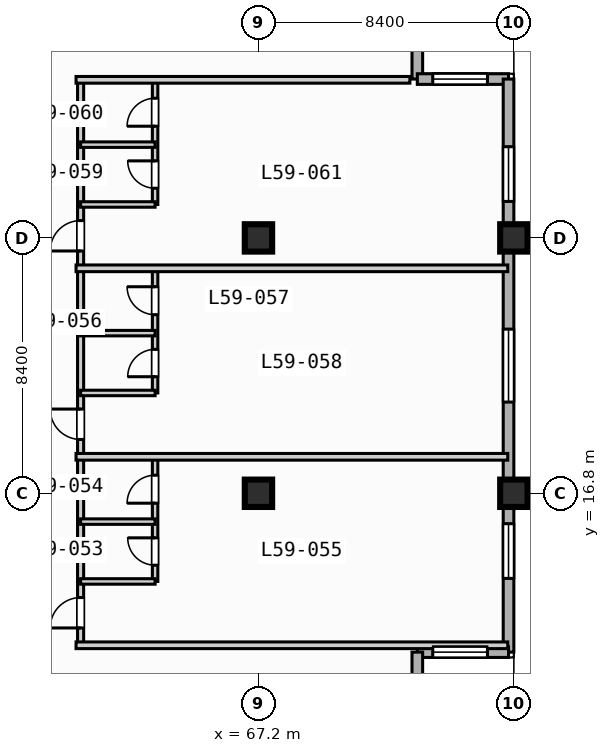
"""IFC4 building model, lengths in metres.
Left out: names, types, materials, properties, quantities, classifications, styles, units other than length and angle.
Written with IfcOpenShell. Run it as: python <this file> out.ifc"""

import sys

from ifc_helpers import new_model, si_unit, direction, frame, frame_2d, origin, origin_2d, place, context, subcontext, project, spatial, rectangle, extrude, element, fill, save


model = new_model("IFC4")
c1 = context("Model", 3, precision=1e-05, world=origin(), true_north=direction((0.0, 1.0)))
c2 = subcontext(c1, "Body", "Model", "MODEL_VIEW")
j1 = project(units=[si_unit("LENGTHUNIT", "METRE"), si_unit("PLANEANGLEUNIT", "RADIAN")], contexts=[c1])
p1 = place(None, origin())
s1 = spatial("IfcSite", under=j1, at=p1, CompositionType="ELEMENT")
p2 = place(p1, origin())
s2 = spatial("IfcBuilding", under=s1, at=p2, CompositionType="ELEMENT")
p3 = place(p2, frame((0.0, 0.0, 241.6)))
s3 = spatial("IfcBuildingStorey", under=s2, at=p3, CompositionType="ELEMENT", Elevation=241.6)
for number, where, z_axis, x_axis in (
    (1, (67.2, 16.8, 0.0), (0.0, 0.0, 1.0), (1.0, 0.0, 0.0)),
    (2, (67.2, 25.2, 0.0), (0.0, 0.0, 1.0), (1.0, 0.0, 0.0)),
    (3, (75.6, 16.8, 0.0), (0.0, 0.0, 1.0), (1.0, 0.0, 0.0)),
    (4, (75.6, 25.2, 0.0), (0.0, 0.0, 1.0), (1.0, 0.0, 0.0)),
):
    element("IfcColumn", number, at=place(p3, frame(where, z_axis=z_axis, x_axis=x_axis)), inside=s3, PredefinedType="COLUMN", context=c2, shape_type="SweptSolid", body=[
        extrude(rectangle(XDim=0.9, YDim=0.9, at=origin_2d()), origin(), (0.0, 0.0, 1.0), 3.7),
    ])
p4 = place(p3, frame((72.425, 33.425, 0.0), z_axis=(0.0, 0.0, 1.0), x_axis=(0.0, -1.0, 0.0)))
e5 = element("IfcWall", 5, at=p4, inside=s3, PredefinedType="STANDARD", context=c2, shape_type="SweptSolid", body=[
    extrude(rectangle(XDim=3.0, YDim=0.35, at=frame_2d((1.5, 0.0))), origin(), (0.0, 0.0, 1.0), 3.47),
])
p5 = place(p3, frame((72.425, 30.425, 0.0), z_axis=(0.0, 0.0, 1.0), x_axis=(1.0, 0.0, 0.0)))
e6 = element("IfcWall", 6, at=p5, inside=s3, PredefinedType="STANDARD", context=c2, shape_type="SweptSolid", body=[
    extrude(rectangle(XDim=3.0, YDim=0.35, at=frame_2d((1.5, 0.0))), origin(), (0.0, 0.0, 1.0), 3.47),
])
p6 = place(p5, frame((0.508, 0.0, 0.85)))
e7 = element("IfcOpeningElement", 7, at=p6, cuts=e6, PredefinedType="OPENING", context=c2, shape_type="SweptSolid", body=[
    extrude(rectangle(XDim=1.8, YDim=1.8, at=frame_2d((0.9, 0.9))), frame((0.0, 0.185, 0.0), z_axis=(0.0, -1.0, 0.0), x_axis=(1.0, 0.0, 0.0)), (0.0, 0.0, 1.0), 0.37),
])
p7 = place(p3, frame((75.425, 30.425, 0.0), z_axis=(0.0, 0.0, 1.0), x_axis=(0.0, -1.0, 0.0)))
e8 = element("IfcWall", 8, at=p7, inside=s3, PredefinedType="STANDARD", context=c2, shape_type="SweptSolid", body=[
    extrude(rectangle(XDim=18.85, YDim=0.35, at=frame_2d((9.425, 0.0))), origin(), (0.0, 0.0, 1.0), 3.47),
])
p8 = place(p7, frame((8.225, 0.0, 0.85)))
e9 = element("IfcOpeningElement", 9, at=p8, cuts=e8, PredefinedType="OPENING", context=c2, shape_type="SweptSolid", body=[
    extrude(rectangle(XDim=2.4, YDim=1.95, at=frame_2d((1.2, 0.975))), frame((0.0, 0.185, 0.0), z_axis=(0.0, -1.0, 0.0), x_axis=(1.0, 0.0, 0.0)), (0.0, 0.0, 1.0), 0.37),
])
p9 = place(p7, frame((14.625, 0.0, 0.85)))
e10 = element("IfcOpeningElement", 10, at=p9, cuts=e8, PredefinedType="OPENING", context=c2, shape_type="SweptSolid", body=[
    extrude(rectangle(XDim=1.8, YDim=1.8, at=frame_2d((0.9, 0.9))), frame((0.0, 0.185, 0.0), z_axis=(0.0, -1.0, 0.0), x_axis=(1.0, 0.0, 0.0)), (0.0, 0.0, 1.0), 0.37),
])
p10 = place(p7, frame((2.225, 0.0, 0.85)))
e11 = element("IfcOpeningElement", 11, at=p10, cuts=e8, PredefinedType="OPENING", context=c2, shape_type="SweptSolid", body=[
    extrude(rectangle(XDim=1.8, YDim=1.8, at=frame_2d((0.9, 0.9))), frame((0.0, 0.185, 0.0), z_axis=(0.0, -1.0, 0.0), x_axis=(1.0, 0.0, 0.0)), (0.0, 0.0, 1.0), 0.37),
])
p11 = place(p3, frame((75.425, 11.575, 0.0), z_axis=(0.0, 0.0, 1.0), x_axis=(-1.0, 0.0, 0.0)))
e12 = element("IfcWall", 12, at=p11, inside=s3, PredefinedType="STANDARD", context=c2, shape_type="SweptSolid", body=[
    extrude(rectangle(XDim=3.0, YDim=0.35, at=frame_2d((1.5, 0.0))), origin(), (0.0, 0.0, 1.0), 3.47),
])
p12 = place(p11, frame((0.692, 0.0, 0.85)))
e13 = element("IfcOpeningElement", 13, at=p12, cuts=e12, PredefinedType="OPENING", context=c2, shape_type="SweptSolid", body=[
    extrude(rectangle(XDim=1.8, YDim=1.8, at=frame_2d((0.9, 0.9))), frame((0.0, 0.185, 0.0), z_axis=(0.0, -1.0, 0.0), x_axis=(1.0, 0.0, 0.0)), (0.0, 0.0, 1.0), 0.37),
])
p13 = place(p3, frame((72.425, 11.575, 0.0), z_axis=(0.0, 0.0, 1.0), x_axis=(0.0, -1.0, 0.0)))
e14 = element("IfcWall", 14, at=p13, inside=s3, PredefinedType="STANDARD", context=c2, shape_type="SweptSolid", body=[
    extrude(rectangle(XDim=3.0, YDim=0.35, at=frame_2d((1.5, 0.0))), origin(), (0.0, 0.0, 1.0), 3.47),
])
p14 = place(p3, frame((61.35, 11.8, 0.0), z_axis=(0.0, 0.0, 1.0), x_axis=(0.0, 1.0, 0.0)))
e15 = element("IfcWall", 15, at=p14, inside=s3, PredefinedType="PARTITIONING", context=c2, shape_type="SweptSolid", body=[
    extrude(rectangle(XDim=18.6, YDim=0.2, at=frame_2d((9.3, 0.0))), origin(), (0.0, 0.0, 1.0), 3.47),
])
p15 = place(p14, frame((0.57, 0.0, 0.0)))
e16 = element("IfcOpeningElement", 16, at=p15, cuts=e15, PredefinedType="OPENING", context=c2, shape_type="SweptSolid", body=[
    extrude(rectangle(XDim=1.0, YDim=2.15, at=frame_2d((0.5, 1.075))), frame((0.0, 0.11, 0.0), z_axis=(0.0, -1.0, 0.0), x_axis=(1.0, 0.0, 0.0)), (0.0, 0.0, 1.0), 0.22),
])
p16 = place(p14, frame((6.77, 0.0, 0.0)))
e17 = element("IfcOpeningElement", 17, at=p16, cuts=e15, PredefinedType="OPENING", context=c2, shape_type="SweptSolid", body=[
    extrude(rectangle(XDim=1.0, YDim=2.15, at=frame_2d((0.5, 1.075))), frame((0.0, 0.11, 0.0), z_axis=(0.0, -1.0, 0.0), x_axis=(1.0, 0.0, 0.0)), (0.0, 0.0, 1.0), 0.22),
])
p17 = place(p14, frame((12.97, 0.0, 0.0)))
e18 = element("IfcOpeningElement", 18, at=p17, cuts=e15, PredefinedType="OPENING", context=c2, shape_type="SweptSolid", body=[
    extrude(rectangle(XDim=1.0, YDim=2.15, at=frame_2d((0.5, 1.075))), frame((0.0, 0.11, 0.0), z_axis=(0.0, -1.0, 0.0), x_axis=(1.0, 0.0, 0.0)), (0.0, 0.0, 1.0), 0.22),
])
p18 = place(p3, frame((61.2, 11.8, 0.0), z_axis=(0.0, 0.0, 1.0), x_axis=(1.0, 0.0, 0.0)))
e19 = element("IfcWall", 19, at=p18, inside=s3, PredefinedType="PARTITIONING", context=c2, shape_type="SweptSolid", body=[
    extrude(rectangle(XDim=14.2, YDim=0.22, at=frame_2d((7.1, 0.0))), origin(), (0.0, 0.0, 1.0), 3.47),
])
p19 = place(p3, frame((63.8, 13.9, 0.0), z_axis=(0.0, 0.0, 1.0), x_axis=(0.0, 1.0, 0.0)))
e20 = element("IfcWall", 20, at=p19, inside=s3, PredefinedType="PLUMBINGWALL", context=c2, shape_type="SweptSolid", body=[
    extrude(rectangle(XDim=4.1, YDim=0.18, at=frame_2d((2.05, 0.0))), origin(), (0.0, 0.0, 1.0), 3.47),
])
p20 = place(p19, frame((0.534, 0.0, 0.0)))
e21 = element("IfcOpeningElement", 21, at=p20, cuts=e20, PredefinedType="OPENING", context=c2, shape_type="SweptSolid", body=[
    extrude(rectangle(XDim=0.9, YDim=2.1, at=frame_2d((0.45, 1.05))), frame((0.0, 0.1, 0.0), z_axis=(0.0, -1.0, 0.0), x_axis=(1.0, 0.0, 0.0)), (0.0, 0.0, 1.0), 0.2),
])
p21 = place(p19, frame((2.574, 0.0, 0.0)))
e22 = element("IfcOpeningElement", 22, at=p21, cuts=e20, PredefinedType="OPENING", context=c2, shape_type="SweptSolid", body=[
    extrude(rectangle(XDim=0.92, YDim=2.1, at=frame_2d((0.46, 1.05))), frame((0.0, 0.1, 0.0), z_axis=(0.0, -1.0, 0.0), x_axis=(1.0, 0.0, 0.0)), (0.0, 0.0, 1.0), 0.2),
])
for number, where, z_axis, x_axis in (
    (23, (61.35, 13.9, 0.0), (0.0, 0.0, 1.0), (1.0, 0.0, 0.0)),
    (24, (61.35, 15.868, 0.0), (0.0, 0.0, 1.0), (1.0, 0.0, 0.0)),
):
    element("IfcWall", number, at=place(p3, frame(where, z_axis=z_axis, x_axis=x_axis)), inside=s3, PredefinedType="PLUMBINGWALL", context=c2, shape_type="SweptSolid", body=[
        extrude(rectangle(XDim=2.45, YDim=0.18, at=frame_2d((1.225, 0.0))), origin(), (0.0, 0.0, 1.0), 3.47),
    ])
p22 = place(p3, frame((61.2, 18.0, 0.0), z_axis=(0.0, 0.0, 1.0), x_axis=(1.0, 0.0, 0.0)))
e25 = element("IfcWall", 25, at=p22, inside=s3, PredefinedType="PARTITIONING", context=c2, shape_type="SweptSolid", body=[
    extrude(rectangle(XDim=14.2, YDim=0.22, at=frame_2d((7.1, 0.0))), origin(), (0.0, 0.0, 1.0), 3.47),
])
p23 = place(p3, frame((63.8, 20.1, 0.0), z_axis=(0.0, 0.0, 1.0), x_axis=(0.0, 1.0, 0.0)))
e26 = element("IfcWall", 26, at=p23, inside=s3, PredefinedType="PLUMBINGWALL", context=c2, shape_type="SweptSolid", body=[
    extrude(rectangle(XDim=4.1, YDim=0.18, at=frame_2d((2.05, 0.0))), origin(), (0.0, 0.0, 1.0), 3.47),
])
p24 = place(p23, frame((0.534, 0.0, 0.0)))
e27 = element("IfcOpeningElement", 27, at=p24, cuts=e26, PredefinedType="OPENING", context=c2, shape_type="SweptSolid", body=[
    extrude(rectangle(XDim=0.9, YDim=2.1, at=frame_2d((0.45, 1.05))), frame((0.0, 0.1, 0.0), z_axis=(0.0, -1.0, 0.0), x_axis=(1.0, 0.0, 0.0)), (0.0, 0.0, 1.0), 0.2),
])
p25 = place(p23, frame((2.574, 0.0, 0.0)))
e28 = element("IfcOpeningElement", 28, at=p25, cuts=e26, PredefinedType="OPENING", context=c2, shape_type="SweptSolid", body=[
    extrude(rectangle(XDim=0.92, YDim=2.1, at=frame_2d((0.46, 1.05))), frame((0.0, 0.1, 0.0), z_axis=(0.0, -1.0, 0.0), x_axis=(1.0, 0.0, 0.0)), (0.0, 0.0, 1.0), 0.2),
])
for number, where, z_axis, x_axis in (
    (29, (61.35, 20.1, 0.0), (0.0, 0.0, 1.0), (1.0, 0.0, 0.0)),
    (30, (61.35, 22.068, 0.0), (0.0, 0.0, 1.0), (1.0, 0.0, 0.0)),
):
    element("IfcWall", number, at=place(p3, frame(where, z_axis=z_axis, x_axis=x_axis)), inside=s3, PredefinedType="PLUMBINGWALL", context=c2, shape_type="SweptSolid", body=[
        extrude(rectangle(XDim=2.45, YDim=0.18, at=frame_2d((1.225, 0.0))), origin(), (0.0, 0.0, 1.0), 3.47),
    ])
p26 = place(p3, frame((61.2, 24.2, 0.0), z_axis=(0.0, 0.0, 1.0), x_axis=(1.0, 0.0, 0.0)))
e31 = element("IfcWall", 31, at=p26, inside=s3, PredefinedType="PARTITIONING", context=c2, shape_type="SweptSolid", body=[
    extrude(rectangle(XDim=14.2, YDim=0.22, at=frame_2d((7.1, 0.0))), origin(), (0.0, 0.0, 1.0), 3.47),
])
p27 = place(p3, frame((63.8, 26.3, 0.0), z_axis=(0.0, 0.0, 1.0), x_axis=(0.0, 1.0, 0.0)))
e32 = element("IfcWall", 32, at=p27, inside=s3, PredefinedType="PLUMBINGWALL", context=c2, shape_type="SweptSolid", body=[
    extrude(rectangle(XDim=4.1, YDim=0.18, at=frame_2d((2.05, 0.0))), origin(), (0.0, 0.0, 1.0), 3.47),
])
p28 = place(p27, frame((0.534, 0.0, 0.0)))
e33 = element("IfcOpeningElement", 33, at=p28, cuts=e32, PredefinedType="OPENING", context=c2, shape_type="SweptSolid", body=[
    extrude(rectangle(XDim=0.9, YDim=2.1, at=frame_2d((0.45, 1.05))), frame((0.0, 0.1, 0.0), z_axis=(0.0, -1.0, 0.0), x_axis=(1.0, 0.0, 0.0)), (0.0, 0.0, 1.0), 0.2),
])
p29 = place(p27, frame((2.574, 0.0, 0.0)))
e34 = element("IfcOpeningElement", 34, at=p29, cuts=e32, PredefinedType="OPENING", context=c2, shape_type="SweptSolid", body=[
    extrude(rectangle(XDim=0.92, YDim=2.1, at=frame_2d((0.46, 1.05))), frame((0.0, 0.1, 0.0), z_axis=(0.0, -1.0, 0.0), x_axis=(1.0, 0.0, 0.0)), (0.0, 0.0, 1.0), 0.2),
])
for number, where, z_axis, x_axis in (
    (35, (61.35, 26.3, 0.0), (0.0, 0.0, 1.0), (1.0, 0.0, 0.0)),
    (36, (61.35, 28.268, 0.0), (0.0, 0.0, 1.0), (1.0, 0.0, 0.0)),
):
    element("IfcWall", number, at=place(p3, frame(where, z_axis=z_axis, x_axis=x_axis)), inside=s3, PredefinedType="PLUMBINGWALL", context=c2, shape_type="SweptSolid", body=[
        extrude(rectangle(XDim=2.45, YDim=0.18, at=frame_2d((1.225, 0.0))), origin(), (0.0, 0.0, 1.0), 3.47),
    ])
p30 = place(p3, frame((61.2, 30.4, 0.0), z_axis=(0.0, 0.0, 1.0), x_axis=(1.0, 0.0, 0.0)))
e37 = element("IfcWall", 37, at=p30, inside=s3, PredefinedType="PARTITIONING", context=c2, shape_type="SweptSolid", body=[
    extrude(rectangle(XDim=10.98, YDim=0.22, at=frame_2d((5.49, 0.0))), origin(), (0.0, 0.0, 1.0), 3.47),
])
p31 = place(p6, origin())
e38 = element("IfcWindow", 38, at=p31, inside=s3, PartitioningType="SINGLE_PANEL", PredefinedType="WINDOW", context=c2, shape_type="SweptSolid", body=[
    extrude(rectangle(XDim=1.8, YDim=1.8, at=frame_2d((0.9, 0.9))), frame((0.0, 0.03, 0.0), z_axis=(0.0, -1.0, 0.0), x_axis=(1.0, 0.0, 0.0)), (0.0, 0.0, 1.0), 0.06),
])
fill(e7, e38)
p32 = place(p8, origin())
e39 = element("IfcWindow", 39, at=p32, inside=s3, PartitioningType="SINGLE_PANEL", PredefinedType="WINDOW", context=c2, shape_type="SweptSolid", body=[
    extrude(rectangle(XDim=2.4, YDim=1.95, at=frame_2d((1.2, 0.975))), frame((0.0, 0.03, 0.0), z_axis=(0.0, -1.0, 0.0), x_axis=(1.0, 0.0, 0.0)), (0.0, 0.0, 1.0), 0.06),
])
fill(e9, e39)
p33 = place(p9, origin())
e40 = element("IfcWindow", 40, at=p33, inside=s3, PartitioningType="SINGLE_PANEL", PredefinedType="WINDOW", context=c2, shape_type="SweptSolid", body=[
    extrude(rectangle(XDim=1.8, YDim=1.8, at=frame_2d((0.9, 0.9))), frame((0.0, 0.03, 0.0), z_axis=(0.0, -1.0, 0.0), x_axis=(1.0, 0.0, 0.0)), (0.0, 0.0, 1.0), 0.06),
])
fill(e10, e40)
p34 = place(p10, origin())
e41 = element("IfcWindow", 41, at=p34, inside=s3, PartitioningType="SINGLE_PANEL", PredefinedType="WINDOW", context=c2, shape_type="SweptSolid", body=[
    extrude(rectangle(XDim=1.8, YDim=1.8, at=frame_2d((0.9, 0.9))), frame((0.0, 0.03, 0.0), z_axis=(0.0, -1.0, 0.0), x_axis=(1.0, 0.0, 0.0)), (0.0, 0.0, 1.0), 0.06),
])
fill(e11, e41)
p35 = place(p12, origin())
e42 = element("IfcWindow", 42, at=p35, inside=s3, PartitioningType="SINGLE_PANEL", PredefinedType="WINDOW", context=c2, shape_type="SweptSolid", body=[
    extrude(rectangle(XDim=1.8, YDim=1.8, at=frame_2d((0.9, 0.9))), frame((0.0, 0.03, 0.0), z_axis=(0.0, -1.0, 0.0), x_axis=(1.0, 0.0, 0.0)), (0.0, 0.0, 1.0), 0.06),
])
fill(e13, e42)
p36 = place(p15, origin())
e43 = element("IfcDoor", 43, at=p36, inside=s3, OperationType="SINGLE_SWING_LEFT", PredefinedType="DOOR", context=c2, shape_type="SweptSolid", body=[
    extrude(rectangle(XDim=1.0, YDim=2.15, at=frame_2d((0.5, 1.075))), frame((0.0, 0.025, 0.0), z_axis=(0.0, -1.0, 0.0), x_axis=(1.0, 0.0, 0.0)), (0.0, 0.0, 1.0), 0.05),
])
fill(e16, e43)
p37 = place(p16, origin())
e44 = element("IfcDoor", 44, at=p37, inside=s3, OperationType="SINGLE_SWING_RIGHT", PredefinedType="DOOR", context=c2, shape_type="SweptSolid", body=[
    extrude(rectangle(XDim=1.0, YDim=2.15, at=frame_2d((0.5, 1.075))), frame((0.0, 0.025, 0.0), z_axis=(0.0, -1.0, 0.0), x_axis=(1.0, 0.0, 0.0)), (0.0, 0.0, 1.0), 0.05),
])
fill(e17, e44)
p38 = place(p17, origin())
e45 = element("IfcDoor", 45, at=p38, inside=s3, OperationType="SINGLE_SWING_LEFT", PredefinedType="DOOR", context=c2, shape_type="SweptSolid", body=[
    extrude(rectangle(XDim=1.0, YDim=2.15, at=frame_2d((0.5, 1.075))), frame((0.0, 0.025, 0.0), z_axis=(0.0, -1.0, 0.0), x_axis=(1.0, 0.0, 0.0)), (0.0, 0.0, 1.0), 0.05),
])
fill(e18, e45)
p39 = place(p20, origin())
e46 = element("IfcDoor", 46, at=p39, inside=s3, OperationType="SINGLE_SWING_RIGHT", PredefinedType="DOOR", context=c2, shape_type="SweptSolid", body=[
    extrude(rectangle(XDim=0.9, YDim=2.1, at=frame_2d((0.45, 1.05))), frame((0.0, 0.025, 0.0), z_axis=(0.0, -1.0, 0.0), x_axis=(1.0, 0.0, 0.0)), (0.0, 0.0, 1.0), 0.05),
])
fill(e21, e46)
p40 = place(p21, origin())
e47 = element("IfcDoor", 47, at=p40, inside=s3, OperationType="SINGLE_SWING_LEFT", PredefinedType="DOOR", context=c2, shape_type="SweptSolid", body=[
    extrude(rectangle(XDim=0.92, YDim=2.1, at=frame_2d((0.46, 1.05))), frame((0.0, 0.025, 0.0), z_axis=(0.0, -1.0, 0.0), x_axis=(1.0, 0.0, 0.0)), (0.0, 0.0, 1.0), 0.05),
])
fill(e22, e47)
p41 = place(p24, origin())
e48 = element("IfcDoor", 48, at=p41, inside=s3, OperationType="SINGLE_SWING_LEFT", PredefinedType="DOOR", context=c2, shape_type="SweptSolid", body=[
    extrude(rectangle(XDim=0.9, YDim=2.1, at=frame_2d((0.45, 1.05))), frame((0.0, 0.025, 0.0), z_axis=(0.0, -1.0, 0.0), x_axis=(1.0, 0.0, 0.0)), (0.0, 0.0, 1.0), 0.05),
])
fill(e27, e48)
p42 = place(p25, origin())
e49 = element("IfcDoor", 49, at=p42, inside=s3, OperationType="SINGLE_SWING_RIGHT", PredefinedType="DOOR", context=c2, shape_type="SweptSolid", body=[
    extrude(rectangle(XDim=0.92, YDim=2.1, at=frame_2d((0.46, 1.05))), frame((0.0, 0.025, 0.0), z_axis=(0.0, -1.0, 0.0), x_axis=(1.0, 0.0, 0.0)), (0.0, 0.0, 1.0), 0.05),
])
fill(e28, e49)
p43 = place(p28, origin())
e50 = element("IfcDoor", 50, at=p43, inside=s3, OperationType="SINGLE_SWING_RIGHT", PredefinedType="DOOR", context=c2, shape_type="SweptSolid", body=[
    extrude(rectangle(XDim=0.9, YDim=2.1, at=frame_2d((0.45, 1.05))), frame((0.0, 0.025, 0.0), z_axis=(0.0, -1.0, 0.0), x_axis=(1.0, 0.0, 0.0)), (0.0, 0.0, 1.0), 0.05),
])
fill(e33, e50)
p44 = place(p29, origin())
e51 = element("IfcDoor", 51, at=p44, inside=s3, OperationType="SINGLE_SWING_LEFT", PredefinedType="DOOR", context=c2, shape_type="SweptSolid", body=[
    extrude(rectangle(XDim=0.92, YDim=2.1, at=frame_2d((0.46, 1.05))), frame((0.0, 0.025, 0.0), z_axis=(0.0, -1.0, 0.0), x_axis=(1.0, 0.0, 0.0)), (0.0, 0.0, 1.0), 0.05),
])
fill(e34, e51)
save(model, sys.argv[1])
